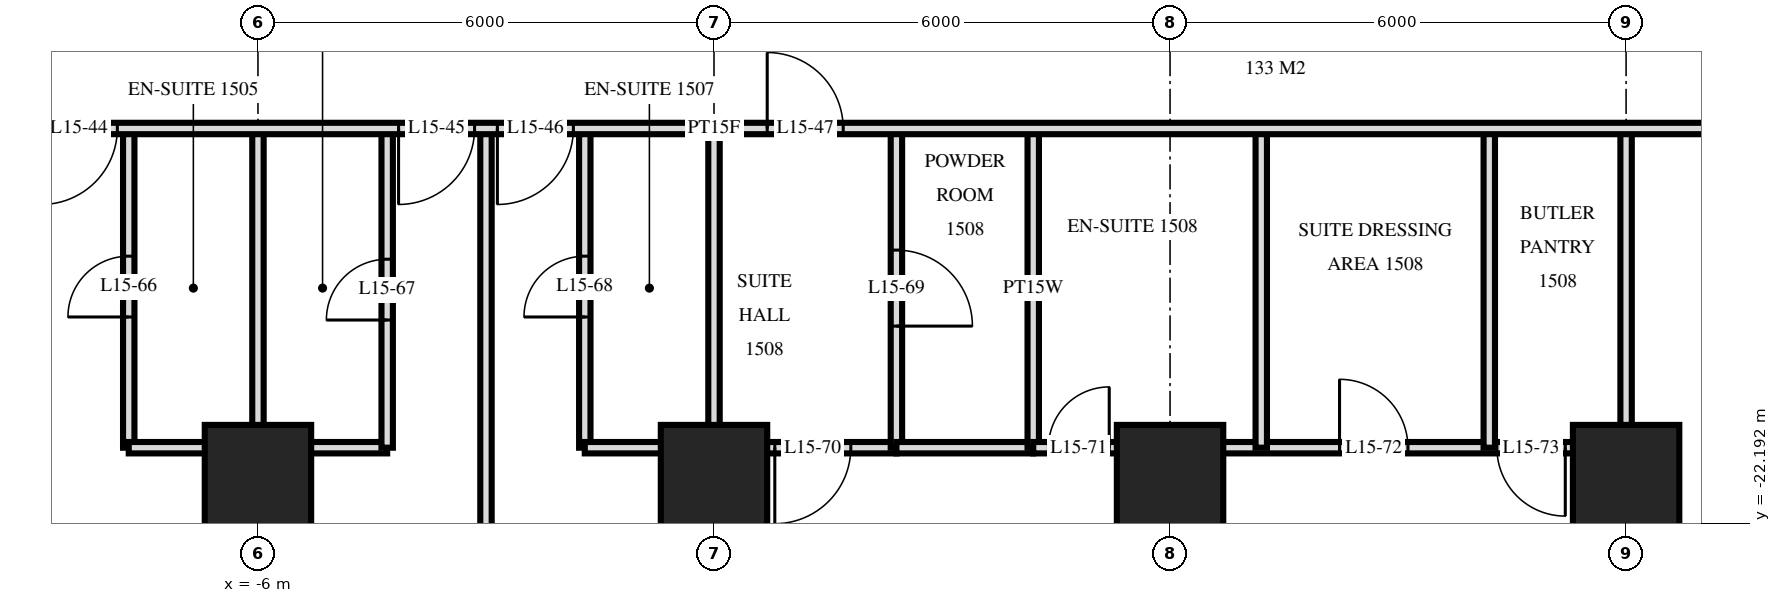
"""IFC4 building model, lengths in metres.
Left out: names, types, materials, properties, quantities, classifications, styles, units other than length and angle.
Written with IfcOpenShell. Run it as: python <this file> out.ifc"""

import sys

from ifc_helpers import new_model, si_unit, direction, frame, frame_2d, origin, origin_2d, place, context, subcontext, project, spatial, rectangle, extrude, element, fill, save


model = new_model("IFC4")
c1 = context("Model", 3, precision=1e-05, world=origin(), true_north=direction((0.0, 1.0)))
c2 = subcontext(c1, "Body", "Model", "MODEL_VIEW")
j1 = project(units=[si_unit("LENGTHUNIT", "METRE"), si_unit("PLANEANGLEUNIT", "RADIAN")], contexts=[c1])
p1 = place(None, origin())
s1 = spatial("IfcSite", under=j1, at=p1, CompositionType="ELEMENT")
p2 = place(p1, origin())
s2 = spatial("IfcBuilding", under=s1, at=p2, CompositionType="ELEMENT")
p3 = place(p2, frame((0.0, 0.0, 63.6)))
s3 = spatial("IfcBuildingStorey", under=s2, at=p3, CompositionType="ELEMENT", Elevation=63.6)
for number, where, z_axis, x_axis in (
    (1, (-6.0, -21.6, 0.0), (0.0, 0.0, 1.0), (1.0, 0.0, 0.0)),
    (2, (0.0, -21.6, 0.0), (0.0, 0.0, 1.0), (1.0, 0.0, 0.0)),
    (3, (6.0, -21.6, 0.0), (0.0, 0.0, 1.0), (1.0, 0.0, 0.0)),
    (4, (12.0, -21.6, 0.0), (0.0, 0.0, 1.0), (1.0, 0.0, 0.0)),
):
    element("IfcColumn", number, at=place(p3, frame(where, z_axis=z_axis, x_axis=x_axis)), inside=s3, PredefinedType="COLUMN", context=c2, shape_type="SweptSolid", body=[
        extrude(rectangle(XDim=1.4, YDim=1.4, at=origin_2d()), origin(), (0.0, 0.0, 1.0), 3.6),
    ])
p4 = place(p3, frame((12.0, -29.22, 0.0), z_axis=(0.0, 0.0, 1.0), x_axis=(0.0, 1.0, 0.0)))
e5 = element("IfcWall", 5, at=p4, inside=s3, PredefinedType="PARTITIONING", context=c2, shape_type="SweptSolid", body=[
    extrude(rectangle(XDim=12.22, YDim=0.15, at=frame_2d((6.11, 0.0))), origin(), (0.0, 0.0, 1.0), 3.32),
])
for number, where, z_axis, x_axis in (
    (6, (10.2, -21.2, 0.0), (0.0, 0.0, 1.0), (0.0, 1.0, 0.0)),
    (7, (7.2, -21.2, 0.0), (0.0, 0.0, 1.0), (0.0, 1.0, 0.0)),
):
    element("IfcWall", number, at=place(p3, frame(where, z_axis=z_axis, x_axis=x_axis)), inside=s3, PredefinedType="PARTITIONING", context=c2, shape_type="SweptSolid", body=[
        extrude(rectangle(XDim=4.2, YDim=0.15, at=frame_2d((2.1, 0.0))), origin(), (0.0, 0.0, 1.0), 3.32),
    ])
p5 = place(p3, frame((6.0, -29.22, 0.0), z_axis=(0.0, 0.0, 1.0), x_axis=(0.0, 1.0, 0.0)))
e8 = element("IfcWall", 8, at=p5, inside=s3, PredefinedType="PARTITIONING", context=c2, shape_type="SweptSolid", body=[
    extrude(rectangle(XDim=8.02, YDim=0.15, at=frame_2d((4.01, 0.0))), origin(), (0.0, 0.0, 1.0), 3.32),
])
p6 = place(p5, frame((3.45, 0.0, 0.0)))
e9 = element("IfcOpeningElement", 9, at=p6, cuts=e8, PredefinedType="OPENING", context=c2, shape_type="SweptSolid", body=[
    extrude(rectangle(XDim=0.9, YDim=2.1, at=frame_2d((0.45, 1.05))), frame((0.0, 0.085, 0.0), z_axis=(0.0, -1.0, 0.0), x_axis=(1.0, 0.0, 0.0)), (0.0, 0.0, 1.0), 0.17),
])
p7 = place(p3, frame((4.2, -21.2, 0.0), z_axis=(0.0, 0.0, 1.0), x_axis=(0.0, 1.0, 0.0)))
e10 = element("IfcWall", 10, at=p7, inside=s3, PredefinedType="PLUMBINGWALL", context=c2, shape_type="SweptSolid", body=[
    extrude(rectangle(XDim=4.2, YDim=0.15, at=frame_2d((2.1, 0.0))), origin(), (0.0, 0.0, 1.0), 3.32),
])
p8 = place(p3, frame((2.4, -21.2, 0.0), z_axis=(0.0, 0.0, 1.0), x_axis=(0.0, 1.0, 0.0)))
e11 = element("IfcWall", 11, at=p8, inside=s3, PredefinedType="PARTITIONING", context=c2, shape_type="SweptSolid", body=[
    extrude(rectangle(XDim=4.2, YDim=0.15, at=frame_2d((2.1, 0.0))), origin(), (0.0, 0.0, 1.0), 3.32),
])
p9 = place(p8, frame((1.6, 0.0, 0.0)))
e12 = element("IfcOpeningElement", 12, at=p9, cuts=e11, PredefinedType="OPENING", context=c2, shape_type="SweptSolid", body=[
    extrude(rectangle(XDim=1.0, YDim=2.1, at=frame_2d((0.5, 1.05))), frame((0.0, 0.085, 0.0), z_axis=(0.0, -1.0, 0.0), x_axis=(1.0, 0.0, 0.0)), (0.0, 0.0, 1.0), 0.17),
])
p10 = place(p3, frame((0.0, -21.2, 0.0), z_axis=(0.0, 0.0, 1.0), x_axis=(0.0, 1.0, 0.0)))
e13 = element("IfcWall", 13, at=p10, inside=s3, PredefinedType="PARTITIONING", context=c2, shape_type="SweptSolid", body=[
    extrude(rectangle(XDim=4.2, YDim=0.15, at=frame_2d((2.1, 0.0))), origin(), (0.0, 0.0, 1.0), 3.32),
])
p11 = place(p3, frame((0.0, -29.22, 0.0), z_axis=(0.0, 0.0, 1.0), x_axis=(0.0, 1.0, 0.0)))
e14 = element("IfcWall", 14, at=p11, inside=s3, PredefinedType="PARTITIONING", context=c2, shape_type="SweptSolid", body=[
    extrude(rectangle(XDim=8.02, YDim=0.15, at=frame_2d((4.01, 0.0))), origin(), (0.0, 0.0, 1.0), 3.32),
])
p12 = place(p3, frame((-1.7, -21.2, 0.0), z_axis=(0.0, 0.0, 1.0), x_axis=(0.0, 1.0, 0.0)))
e15 = element("IfcWall", 15, at=p12, inside=s3, PredefinedType="PARTITIONING", context=c2, shape_type="SweptSolid", body=[
    extrude(rectangle(XDim=4.2, YDim=0.15, at=frame_2d((2.1, 0.0))), origin(), (0.0, 0.0, 1.0), 3.32),
])
p13 = place(p12, frame((1.72, 0.0, 0.0)))
e16 = element("IfcOpeningElement", 16, at=p13, cuts=e15, PredefinedType="OPENING", context=c2, shape_type="SweptSolid", body=[
    extrude(rectangle(XDim=0.8, YDim=2.1, at=frame_2d((0.4, 1.05))), frame((0.0, 0.085, 0.0), z_axis=(0.0, -1.0, 0.0), x_axis=(1.0, 0.0, 0.0)), (0.0, 0.0, 1.0), 0.17),
])
p14 = place(p3, frame((-3.0, -29.22, 0.0), z_axis=(0.0, 0.0, 1.0), x_axis=(0.0, 1.0, 0.0)))
e17 = element("IfcWall", 17, at=p14, inside=s3, PredefinedType="PARTITIONING", context=c2, shape_type="SweptSolid", body=[
    extrude(rectangle(XDim=12.22, YDim=0.15, at=frame_2d((6.11, 0.0))), origin(), (0.0, 0.0, 1.0), 3.32),
])
p15 = place(p3, frame((-4.3, -21.2, 0.0), z_axis=(0.0, 0.0, 1.0), x_axis=(0.0, 1.0, 0.0)))
e18 = element("IfcWall", 18, at=p15, inside=s3, PredefinedType="PARTITIONING", context=c2, shape_type="SweptSolid", body=[
    extrude(rectangle(XDim=4.2, YDim=0.15, at=frame_2d((2.1, 0.0))), origin(), (0.0, 0.0, 1.0), 3.32),
])
p16 = place(p15, frame((1.68, 0.0, 0.0)))
e19 = element("IfcOpeningElement", 19, at=p16, cuts=e18, PredefinedType="OPENING", context=c2, shape_type="SweptSolid", body=[
    extrude(rectangle(XDim=0.8, YDim=2.1, at=frame_2d((0.4, 1.05))), frame((0.0, 0.085, 0.0), z_axis=(0.0, -1.0, 0.0), x_axis=(1.0, 0.0, 0.0)), (0.0, 0.0, 1.0), 0.17),
])
p17 = place(p3, frame((-6.0, -29.22, 0.0), z_axis=(0.0, 0.0, 1.0), x_axis=(0.0, 1.0, 0.0)))
e20 = element("IfcWall", 20, at=p17, inside=s3, PredefinedType="PARTITIONING", context=c2, shape_type="SweptSolid", body=[
    extrude(rectangle(XDim=12.22, YDim=0.15, at=frame_2d((6.11, 0.0))), origin(), (0.0, 0.0, 1.0), 3.32),
])
p18 = place(p3, frame((-7.7, -21.2, 0.0), z_axis=(0.0, 0.0, 1.0), x_axis=(0.0, 1.0, 0.0)))
e21 = element("IfcWall", 21, at=p18, inside=s3, PredefinedType="PARTITIONING", context=c2, shape_type="SweptSolid", body=[
    extrude(rectangle(XDim=4.2, YDim=0.15, at=frame_2d((2.1, 0.0))), origin(), (0.0, 0.0, 1.0), 3.32),
])
p19 = place(p18, frame((1.72, 0.0, 0.0)))
e22 = element("IfcOpeningElement", 22, at=p19, cuts=e21, PredefinedType="OPENING", context=c2, shape_type="SweptSolid", body=[
    extrude(rectangle(XDim=0.8, YDim=2.1, at=frame_2d((0.4, 1.05))), frame((0.0, 0.085, 0.0), z_axis=(0.0, -1.0, 0.0), x_axis=(1.0, 0.0, 0.0)), (0.0, 0.0, 1.0), 0.17),
])
p20 = place(p3, frame((0.0, -21.2, 0.0), z_axis=(0.0, 0.0, 1.0), x_axis=(1.0, 0.0, 0.0)))
e23 = element("IfcWall", 23, at=p20, inside=s3, PredefinedType="PARTITIONING", context=c2, shape_type="SweptSolid", body=[
    extrude(rectangle(XDim=2.4, YDim=0.15, at=frame_2d((1.2, 0.0))), origin(), (0.0, 0.0, 1.0), 3.32),
])
p21 = place(p20, frame((0.8, 0.0, 0.0)))
e24 = element("IfcOpeningElement", 24, at=p21, cuts=e23, PredefinedType="OPENING", context=c2, shape_type="SweptSolid", body=[
    extrude(rectangle(XDim=1.0, YDim=2.1, at=frame_2d((0.5, 1.05))), frame((0.0, 0.085, 0.0), z_axis=(0.0, -1.0, 0.0), x_axis=(1.0, 0.0, 0.0)), (0.0, 0.0, 1.0), 0.17),
])
p22 = place(p3, frame((-7.7, -21.2, 0.0), z_axis=(0.0, 0.0, 1.0), x_axis=(1.0, 0.0, 0.0)))
e25 = element("IfcWall", 25, at=p22, inside=s3, PredefinedType="PARTITIONING", context=c2, shape_type="SweptSolid", body=[
    extrude(rectangle(XDim=3.4, YDim=0.15, at=frame_2d((1.7, 0.0))), origin(), (0.0, 0.0, 1.0), 3.32),
])
p23 = place(p3, frame((-1.7, -21.2, 0.0), z_axis=(0.0, 0.0, 1.0), x_axis=(1.0, 0.0, 0.0)))
e26 = element("IfcWall", 26, at=p23, inside=s3, PredefinedType="PARTITIONING", context=c2, shape_type="SweptSolid", body=[
    extrude(rectangle(XDim=1.7, YDim=0.15, at=frame_2d((0.85, 0.0))), origin(), (0.0, 0.0, 1.0), 3.32),
])
p24 = place(p3, frame((4.2, -21.2, 0.0), z_axis=(0.0, 0.0, 1.0), x_axis=(1.0, 0.0, 0.0)))
e27 = element("IfcWall", 27, at=p24, inside=s3, PredefinedType="PARTITIONING", context=c2, shape_type="SweptSolid", body=[
    extrude(rectangle(XDim=7.8, YDim=0.15, at=frame_2d((3.9, 0.0))), origin(), (0.0, 0.0, 1.0), 3.32),
])
p25 = place(p24, frame((0.2, 0.0, 0.0)))
e28 = element("IfcOpeningElement", 28, at=p25, cuts=e27, PredefinedType="OPENING", context=c2, shape_type="SweptSolid", body=[
    extrude(rectangle(XDim=0.8, YDim=2.1, at=frame_2d((0.4, 1.05))), frame((0.0, 0.085, 0.0), z_axis=(0.0, -1.0, 0.0), x_axis=(1.0, 0.0, 0.0)), (0.0, 0.0, 1.0), 0.17),
])
p26 = place(p24, frame((4.03, 0.0, 0.0)))
e29 = element("IfcOpeningElement", 29, at=p26, cuts=e27, PredefinedType="OPENING", context=c2, shape_type="SweptSolid", body=[
    extrude(rectangle(XDim=0.9, YDim=2.1, at=frame_2d((0.45, 1.05))), frame((0.0, 0.085, 0.0), z_axis=(0.0, -1.0, 0.0), x_axis=(1.0, 0.0, 0.0)), (0.0, 0.0, 1.0), 0.17),
])
p27 = place(p24, frame((6.1, 0.0, 0.0)))
e30 = element("IfcOpeningElement", 30, at=p27, cuts=e27, PredefinedType="OPENING", context=c2, shape_type="SweptSolid", body=[
    extrude(rectangle(XDim=0.9, YDim=2.1, at=frame_2d((0.45, 1.05))), frame((0.0, 0.085, 0.0), z_axis=(0.0, -1.0, 0.0), x_axis=(1.0, 0.0, 0.0)), (0.0, 0.0, 1.0), 0.17),
])
p28 = place(p3, frame((2.4, -21.2, 0.0), z_axis=(0.0, 0.0, 1.0), x_axis=(1.0, 0.0, 0.0)))
e31 = element("IfcWall", 31, at=p28, inside=s3, PredefinedType="PLUMBINGWALL", context=c2, shape_type="SweptSolid", body=[
    extrude(rectangle(XDim=1.8, YDim=0.15, at=frame_2d((0.9, 0.0))), origin(), (0.0, 0.0, 1.0), 3.32),
])
p29 = place(p3, frame((-33.12, -17.0, 0.0), z_axis=(0.0, 0.0, 1.0), x_axis=(1.0, 0.0, 0.0)))
e32 = element("IfcWall", 32, at=p29, inside=s3, PredefinedType="PARTITIONING", context=c2, shape_type="SweptSolid", body=[
    extrude(rectangle(XDim=66.24, YDim=0.15, at=frame_2d((33.12, 0.0))), origin(), (0.0, 0.0, 1.0), 3.32),
])
p30 = place(p29, frame((12.27, 0.0, 0.0)))
e33 = element("IfcOpeningElement", 33, at=p30, cuts=e32, PredefinedType="OPENING", context=c2, shape_type="SweptSolid", body=[
    extrude(rectangle(XDim=1.0, YDim=2.1, at=frame_2d((0.5, 1.05))), frame((0.0, 0.085, 0.0), z_axis=(0.0, -1.0, 0.0), x_axis=(1.0, 0.0, 0.0)), (0.0, 0.0, 1.0), 0.17),
])
p31 = place(p29, frame((16.97, 0.0, 0.0)))
e34 = element("IfcOpeningElement", 34, at=p31, cuts=e32, PredefinedType="OPENING", context=c2, shape_type="SweptSolid", body=[
    extrude(rectangle(XDim=1.0, YDim=2.1, at=frame_2d((0.5, 1.05))), frame((0.0, 0.085, 0.0), z_axis=(0.0, -1.0, 0.0), x_axis=(1.0, 0.0, 0.0)), (0.0, 0.0, 1.0), 0.17),
])
p32 = place(p29, frame((18.27, 0.0, 0.0)))
e35 = element("IfcOpeningElement", 35, at=p32, cuts=e32, PredefinedType="OPENING", context=c2, shape_type="SweptSolid", body=[
    extrude(rectangle(XDim=1.0, YDim=2.1, at=frame_2d((0.5, 1.05))), frame((0.0, 0.085, 0.0), z_axis=(0.0, -1.0, 0.0), x_axis=(1.0, 0.0, 0.0)), (0.0, 0.0, 1.0), 0.17),
])
p33 = place(p29, frame((22.97, 0.0, 0.0)))
e36 = element("IfcOpeningElement", 36, at=p33, cuts=e32, PredefinedType="OPENING", context=c2, shape_type="SweptSolid", body=[
    extrude(rectangle(XDim=1.0, YDim=2.1, at=frame_2d((0.5, 1.05))), frame((0.0, 0.085, 0.0), z_axis=(0.0, -1.0, 0.0), x_axis=(1.0, 0.0, 0.0)), (0.0, 0.0, 1.0), 0.17),
])
p34 = place(p29, frame((24.27, 0.0, 0.0)))
e37 = element("IfcOpeningElement", 37, at=p34, cuts=e32, PredefinedType="OPENING", context=c2, shape_type="SweptSolid", body=[
    extrude(rectangle(XDim=1.0, YDim=2.1, at=frame_2d((0.5, 1.05))), frame((0.0, 0.085, 0.0), z_axis=(0.0, -1.0, 0.0), x_axis=(1.0, 0.0, 0.0)), (0.0, 0.0, 1.0), 0.17),
])
p35 = place(p29, frame((28.97, 0.0, 0.0)))
e38 = element("IfcOpeningElement", 38, at=p35, cuts=e32, PredefinedType="OPENING", context=c2, shape_type="SweptSolid", body=[
    extrude(rectangle(XDim=1.0, YDim=2.1, at=frame_2d((0.5, 1.05))), frame((0.0, 0.085, 0.0), z_axis=(0.0, -1.0, 0.0), x_axis=(1.0, 0.0, 0.0)), (0.0, 0.0, 1.0), 0.17),
])
p36 = place(p29, frame((30.27, 0.0, 0.0)))
e39 = element("IfcOpeningElement", 39, at=p36, cuts=e32, PredefinedType="OPENING", context=c2, shape_type="SweptSolid", body=[
    extrude(rectangle(XDim=1.0, YDim=2.1, at=frame_2d((0.5, 1.05))), frame((0.0, 0.085, 0.0), z_axis=(0.0, -1.0, 0.0), x_axis=(1.0, 0.0, 0.0)), (0.0, 0.0, 1.0), 0.17),
])
p37 = place(p29, frame((33.82, 0.0, 0.0)))
e40 = element("IfcOpeningElement", 40, at=p37, cuts=e32, PredefinedType="OPENING", context=c2, shape_type="SweptSolid", body=[
    extrude(rectangle(XDim=1.0, YDim=2.1, at=frame_2d((0.5, 1.05))), frame((0.0, 0.085, 0.0), z_axis=(0.0, -1.0, 0.0), x_axis=(1.0, 0.0, 0.0)), (0.0, 0.0, 1.0), 0.17),
])
p38 = place(p29, frame((46.27, 0.0, 0.0)))
e41 = element("IfcOpeningElement", 41, at=p38, cuts=e32, PredefinedType="OPENING", context=c2, shape_type="SweptSolid", body=[
    extrude(rectangle(XDim=1.0, YDim=2.1, at=frame_2d((0.5, 1.05))), frame((0.0, 0.085, 0.0), z_axis=(0.0, -1.0, 0.0), x_axis=(1.0, 0.0, 0.0)), (0.0, 0.0, 1.0), 0.17),
])
p39 = place(p29, frame((52.97, 0.0, 0.0)))
e42 = element("IfcOpeningElement", 42, at=p39, cuts=e32, PredefinedType="OPENING", context=c2, shape_type="SweptSolid", body=[
    extrude(rectangle(XDim=1.0, YDim=2.1, at=frame_2d((0.5, 1.05))), frame((0.0, 0.085, 0.0), z_axis=(0.0, -1.0, 0.0), x_axis=(1.0, 0.0, 0.0)), (0.0, 0.0, 1.0), 0.17),
])
p40 = place(p29, frame((6.05, 0.0, 0.0)))
e43 = element("IfcOpeningElement", 43, at=p40, cuts=e32, PredefinedType="OPENING", context=c2, shape_type="SweptSolid", body=[
    extrude(rectangle(XDim=1.0, YDim=2.1, at=frame_2d((0.5, 1.05))), frame((0.0, 0.085, 0.0), z_axis=(0.0, -1.0, 0.0), x_axis=(1.0, 0.0, 0.0)), (0.0, 0.0, 1.0), 0.17),
])
p41 = place(p29, frame((59.15, 0.0, 0.0)))
e44 = element("IfcOpeningElement", 44, at=p41, cuts=e32, PredefinedType="OPENING", context=c2, shape_type="SweptSolid", body=[
    extrude(rectangle(XDim=1.0, YDim=2.1, at=frame_2d((0.5, 1.05))), frame((0.0, 0.085, 0.0), z_axis=(0.0, -1.0, 0.0), x_axis=(1.0, 0.0, 0.0)), (0.0, 0.0, 1.0), 0.17),
])
p42 = place(p34, frame((0.5, 0.0, 0.0), z_axis=(0.0, 0.0, 1.0), x_axis=(-1.0, 0.0, 0.0)))
e45 = element("IfcDoor", 45, at=p42, inside=s3, OperationType="SINGLE_SWING_LEFT", PredefinedType="DOOR", context=c2, shape_type="SweptSolid", body=[
    extrude(rectangle(XDim=1.0, YDim=2.1, at=frame_2d((0.0, 1.05))), frame((0.0, -0.025, 0.0), z_axis=(0.0, 1.0, 0.0), x_axis=(-1.0, 0.0, 0.0)), (0.0, 0.0, 1.0), 0.05),
])
fill(e37, e45)
p43 = place(p35, frame((0.5, 0.0, 0.0), z_axis=(0.0, 0.0, 1.0), x_axis=(-1.0, 0.0, 0.0)))
e46 = element("IfcDoor", 46, at=p43, inside=s3, OperationType="SINGLE_SWING_LEFT", PredefinedType="DOOR", context=c2, shape_type="SweptSolid", body=[
    extrude(rectangle(XDim=1.0, YDim=2.1, at=frame_2d((0.0, 1.05))), frame((0.0, -0.025, 0.0), z_axis=(0.0, 1.0, 0.0), x_axis=(-1.0, 0.0, 0.0)), (0.0, 0.0, 1.0), 0.05),
])
fill(e38, e46)
p44 = place(p36, frame((0.5, 0.0, 0.0), z_axis=(0.0, 0.0, 1.0), x_axis=(-1.0, 0.0, 0.0)))
e47 = element("IfcDoor", 47, at=p44, inside=s3, OperationType="SINGLE_SWING_LEFT", PredefinedType="DOOR", context=c2, shape_type="SweptSolid", body=[
    extrude(rectangle(XDim=1.0, YDim=2.1, at=frame_2d((0.0, 1.05))), frame((0.0, -0.025, 0.0), z_axis=(0.0, 1.0, 0.0), x_axis=(-1.0, 0.0, 0.0)), (0.0, 0.0, 1.0), 0.05),
])
fill(e39, e47)
p45 = place(p37, origin())
e48 = element("IfcDoor", 48, at=p45, inside=s3, OperationType="SINGLE_SWING_RIGHT", PredefinedType="DOOR", context=c2, shape_type="SweptSolid", body=[
    extrude(rectangle(XDim=1.0, YDim=2.1, at=frame_2d((0.5, 1.05))), frame((0.0, 0.025, 0.0), z_axis=(0.0, -1.0, 0.0), x_axis=(1.0, 0.0, 0.0)), (0.0, 0.0, 1.0), 0.05),
])
fill(e40, e48)
p46 = place(p19, origin())
e49 = element("IfcDoor", 49, at=p46, inside=s3, OperationType="SINGLE_SWING_RIGHT", PredefinedType="DOOR", context=c2, shape_type="SweptSolid", body=[
    extrude(rectangle(XDim=0.8, YDim=2.1, at=frame_2d((0.4, 1.05))), frame((0.0, 0.025, 0.0), z_axis=(0.0, -1.0, 0.0), x_axis=(1.0, 0.0, 0.0)), (0.0, 0.0, 1.0), 0.05),
])
fill(e22, e49)
p47 = place(p16, origin())
e50 = element("IfcDoor", 50, at=p47, inside=s3, OperationType="SINGLE_SWING_RIGHT", PredefinedType="DOOR", context=c2, shape_type="SweptSolid", body=[
    extrude(rectangle(XDim=0.8, YDim=2.1, at=frame_2d((0.4, 1.05))), frame((0.0, 0.025, 0.0), z_axis=(0.0, -1.0, 0.0), x_axis=(1.0, 0.0, 0.0)), (0.0, 0.0, 1.0), 0.05),
])
fill(e19, e50)
p48 = place(p13, origin())
e51 = element("IfcDoor", 51, at=p48, inside=s3, OperationType="SINGLE_SWING_RIGHT", PredefinedType="DOOR", context=c2, shape_type="SweptSolid", body=[
    extrude(rectangle(XDim=0.8, YDim=2.1, at=frame_2d((0.4, 1.05))), frame((0.0, 0.025, 0.0), z_axis=(0.0, -1.0, 0.0), x_axis=(1.0, 0.0, 0.0)), (0.0, 0.0, 1.0), 0.05),
])
fill(e16, e51)
p49 = place(p9, frame((0.5, 0.0, 0.0), z_axis=(0.0, 0.0, 1.0), x_axis=(-1.0, 0.0, 0.0)))
e52 = element("IfcDoor", 52, at=p49, inside=s3, OperationType="SINGLE_SWING_LEFT", PredefinedType="DOOR", context=c2, shape_type="SweptSolid", body=[
    extrude(rectangle(XDim=1.0, YDim=2.1, at=frame_2d((0.0, 1.05))), frame((0.0, -0.025, 0.0), z_axis=(0.0, 1.0, 0.0), x_axis=(-1.0, 0.0, 0.0)), (0.0, 0.0, 1.0), 0.05),
])
fill(e12, e52)
p50 = place(p21, frame((0.5, 0.0, 0.0), z_axis=(0.0, 0.0, 1.0), x_axis=(-1.0, 0.0, 0.0)))
e53 = element("IfcDoor", 53, at=p50, inside=s3, OperationType="SINGLE_SWING_LEFT", PredefinedType="DOOR", context=c2, shape_type="SweptSolid", body=[
    extrude(rectangle(XDim=1.0, YDim=2.1, at=frame_2d((0.0, 1.05))), frame((0.0, -0.025, 0.0), z_axis=(0.0, 1.0, 0.0), x_axis=(-1.0, 0.0, 0.0)), (0.0, 0.0, 1.0), 0.05),
])
fill(e24, e53)
p51 = place(p25, origin())
e54 = element("IfcDoor", 54, at=p51, inside=s3, OperationType="SINGLE_SWING_LEFT", PredefinedType="DOOR", context=c2, shape_type="SweptSolid", body=[
    extrude(rectangle(XDim=0.8, YDim=2.1, at=frame_2d((0.4, 1.05))), frame((0.0, 0.025, 0.0), z_axis=(0.0, -1.0, 0.0), x_axis=(1.0, 0.0, 0.0)), (0.0, 0.0, 1.0), 0.05),
])
fill(e28, e54)
p52 = place(p26, origin())
e55 = element("IfcDoor", 55, at=p52, inside=s3, OperationType="SINGLE_SWING_RIGHT", PredefinedType="DOOR", context=c2, shape_type="SweptSolid", body=[
    extrude(rectangle(XDim=0.9, YDim=2.1, at=frame_2d((0.45, 1.05))), frame((0.0, 0.025, 0.0), z_axis=(0.0, -1.0, 0.0), x_axis=(1.0, 0.0, 0.0)), (0.0, 0.0, 1.0), 0.05),
])
fill(e29, e55)
p53 = place(p27, frame((0.45, 0.0, 0.0), z_axis=(0.0, 0.0, 1.0), x_axis=(-1.0, 0.0, 0.0)))
e56 = element("IfcDoor", 56, at=p53, inside=s3, OperationType="SINGLE_SWING_RIGHT", PredefinedType="DOOR", context=c2, shape_type="SweptSolid", body=[
    extrude(rectangle(XDim=0.9, YDim=2.1, at=frame_2d((0.0, 1.05))), frame((0.0, -0.025, 0.0), z_axis=(0.0, 1.0, 0.0), x_axis=(-1.0, 0.0, 0.0)), (0.0, 0.0, 1.0), 0.05),
])
fill(e30, e56)
save(model, sys.argv[1])
